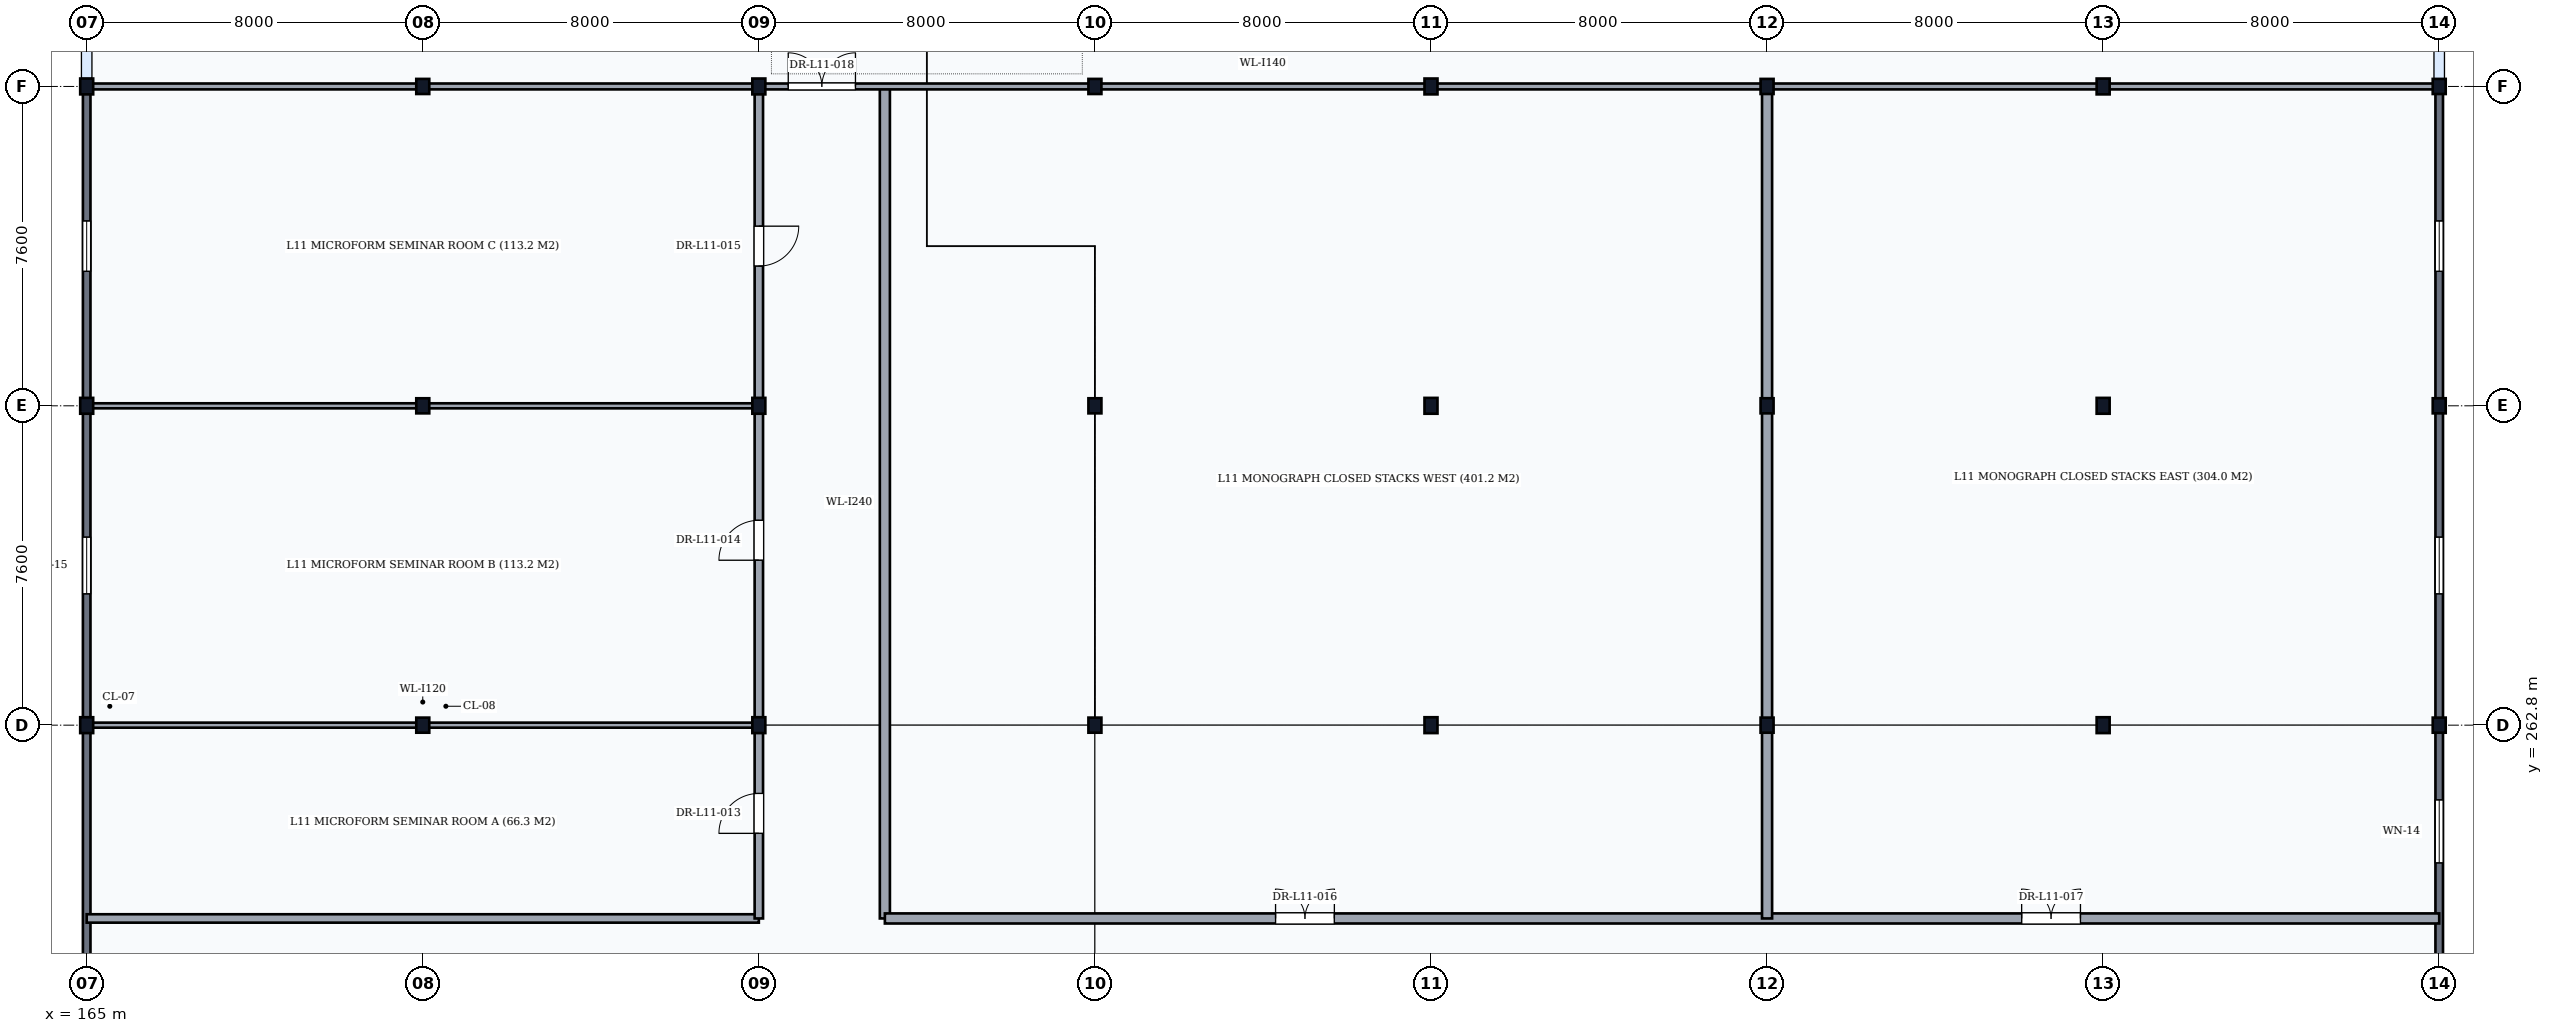
"""IFC4 building model, lengths in metres.
Left out: names, types, materials, properties, quantities, classifications, styles, units other than length and angle.
Written with IfcOpenShell. Run it as: python <this file> out.ifc"""

import sys

from ifc_helpers import new_model, si_unit, direction, frame, frame_2d, origin, origin_2d, place, context, subcontext, project, spatial, rectangle, i_section, extrude, element, fill, save


model = new_model("IFC4")
c1 = context("Model", 3, precision=1e-05, world=origin(), true_north=direction((0.0, 1.0)))
c2 = subcontext(c1, "Body", "Model", "MODEL_VIEW")
j1 = project(units=[si_unit("LENGTHUNIT", "METRE"), si_unit("PLANEANGLEUNIT", "RADIAN")], contexts=[c1])
p1 = place(None, origin())
s1 = spatial("IfcSite", under=j1, at=p1, CompositionType="ELEMENT")
p2 = place(p1, origin())
s2 = spatial("IfcBuilding", under=s1, at=p2, CompositionType="ELEMENT")
p3 = place(p2, frame((0.0, 0.0, 43.8)))
s3 = spatial("IfcBuildingStorey", under=s2, at=p3, CompositionType="ELEMENT", Elevation=43.8)
for number, where, z_axis, x_axis in (
    (1, (165.0, 262.8, 0.0), (0.0, 0.0, 1.0), (1.0, 0.0, 0.0)),
    (2, (165.0, 270.4, 0.0), (0.0, 0.0, 1.0), (1.0, 0.0, 0.0)),
    (3, (165.0, 278.0, 0.0), (0.0, 0.0, 1.0), (1.0, 0.0, 0.0)),
):
    element("IfcColumn", number, at=place(p3, frame(where, z_axis=z_axis, x_axis=x_axis)), inside=s3, PredefinedType="COLUMN", context=c2, shape_type="SweptSolid", body=[
        extrude(i_section(OverallWidth=0.309, OverallDepth=0.377, WebThickness=0.021, FlangeThickness=0.04, FilletRadius=0.027, at=origin_2d()), origin(), (0.0, 0.0, 1.0), 3.9),
    ])
for number, where, z_axis, x_axis in (
    (4, (173.0, 262.8, 0.0), (0.0, 0.0, 1.0), (1.0, 0.0, 0.0)),
    (5, (173.0, 270.4, 0.0), (0.0, 0.0, 1.0), (1.0, 0.0, 0.0)),
    (6, (173.0, 278.0, 0.0), (0.0, 0.0, 1.0), (1.0, 0.0, 0.0)),
):
    element("IfcColumn", number, at=place(p3, frame(where, z_axis=z_axis, x_axis=x_axis)), inside=s3, PredefinedType="COLUMN", context=c2, shape_type="SweptSolid", body=[
        extrude(i_section(OverallWidth=0.309, OverallDepth=0.359, WebThickness=0.021, FlangeThickness=0.04, FilletRadius=0.027, at=origin_2d()), origin(), (0.0, 0.0, 1.0), 3.9),
    ])
for number, where, z_axis, x_axis in (
    (7, (181.0, 262.8, 0.0), (0.0, 0.0, 1.0), (1.0, 0.0, 0.0)),
    (8, (181.0, 270.4, 0.0), (0.0, 0.0, 1.0), (1.0, 0.0, 0.0)),
    (9, (181.0, 278.0, 0.0), (0.0, 0.0, 1.0), (1.0, 0.0, 0.0)),
):
    element("IfcColumn", number, at=place(p3, frame(where, z_axis=z_axis, x_axis=x_axis)), inside=s3, PredefinedType="COLUMN", context=c2, shape_type="SweptSolid", body=[
        extrude(i_section(OverallWidth=0.309, OverallDepth=0.377, WebThickness=0.021, FlangeThickness=0.04, FilletRadius=0.027, at=origin_2d()), origin(), (0.0, 0.0, 1.0), 3.9),
    ])
for number, where, z_axis, x_axis in (
    (10, (189.0, 262.8, 0.0), (0.0, 0.0, 1.0), (1.0, 0.0, 0.0)),
    (11, (189.0, 270.4, 0.0), (0.0, 0.0, 1.0), (1.0, 0.0, 0.0)),
    (12, (189.0, 278.0, 0.0), (0.0, 0.0, 1.0), (1.0, 0.0, 0.0)),
):
    element("IfcColumn", number, at=place(p3, frame(where, z_axis=z_axis, x_axis=x_axis)), inside=s3, PredefinedType="COLUMN", context=c2, shape_type="SweptSolid", body=[
        extrude(i_section(OverallWidth=0.309, OverallDepth=0.359, WebThickness=0.021, FlangeThickness=0.04, FilletRadius=0.027, at=origin_2d()), origin(), (0.0, 0.0, 1.0), 3.9),
    ])
for number, where, z_axis, x_axis in (
    (13, (197.0, 262.8, 0.0), (0.0, 0.0, 1.0), (1.0, 0.0, 0.0)),
    (14, (197.0, 270.4, 0.0), (0.0, 0.0, 1.0), (1.0, 0.0, 0.0)),
    (15, (197.0, 278.0, 0.0), (0.0, 0.0, 1.0), (1.0, 0.0, 0.0)),
):
    element("IfcColumn", number, at=place(p3, frame(where, z_axis=z_axis, x_axis=x_axis)), inside=s3, PredefinedType="COLUMN", context=c2, shape_type="SweptSolid", body=[
        extrude(i_section(OverallWidth=0.309, OverallDepth=0.377, WebThickness=0.021, FlangeThickness=0.04, FilletRadius=0.027, at=origin_2d()), origin(), (0.0, 0.0, 1.0), 3.9),
    ])
for number, where, z_axis, x_axis in (
    (16, (205.0, 262.8, 0.0), (0.0, 0.0, 1.0), (1.0, 0.0, 0.0)),
    (17, (205.0, 270.4, 0.0), (0.0, 0.0, 1.0), (1.0, 0.0, 0.0)),
    (18, (205.0, 278.0, 0.0), (0.0, 0.0, 1.0), (1.0, 0.0, 0.0)),
):
    element("IfcColumn", number, at=place(p3, frame(where, z_axis=z_axis, x_axis=x_axis)), inside=s3, PredefinedType="COLUMN", context=c2, shape_type="SweptSolid", body=[
        extrude(i_section(OverallWidth=0.309, OverallDepth=0.359, WebThickness=0.021, FlangeThickness=0.04, FilletRadius=0.027, at=origin_2d()), origin(), (0.0, 0.0, 1.0), 3.9),
    ])
for number, where, z_axis, x_axis in (
    (19, (213.0, 262.8, 0.0), (0.0, 0.0, 1.0), (1.0, 0.0, 0.0)),
    (20, (213.0, 270.4, 0.0), (0.0, 0.0, 1.0), (1.0, 0.0, 0.0)),
    (21, (213.0, 278.0, 0.0), (0.0, 0.0, 1.0), (1.0, 0.0, 0.0)),
):
    element("IfcColumn", number, at=place(p3, frame(where, z_axis=z_axis, x_axis=x_axis)), inside=s3, PredefinedType="COLUMN", context=c2, shape_type="SweptSolid", body=[
        extrude(i_section(OverallWidth=0.309, OverallDepth=0.377, WebThickness=0.021, FlangeThickness=0.04, FilletRadius=0.027, at=origin_2d()), origin(), (0.0, 0.0, 1.0), 3.9),
    ])
for number, where, z_axis, x_axis in (
    (22, (221.0, 262.8, 0.0), (0.0, 0.0, 1.0), (1.0, 0.0, 0.0)),
    (23, (221.0, 270.4, 0.0), (0.0, 0.0, 1.0), (1.0, 0.0, 0.0)),
    (24, (221.0, 278.0, 0.0), (0.0, 0.0, 1.0), (1.0, 0.0, 0.0)),
):
    element("IfcColumn", number, at=place(p3, frame(where, z_axis=z_axis, x_axis=x_axis)), inside=s3, PredefinedType="COLUMN", context=c2, shape_type="SweptSolid", body=[
        extrude(i_section(OverallWidth=0.309, OverallDepth=0.359, WebThickness=0.021, FlangeThickness=0.04, FilletRadius=0.027, at=origin_2d()), origin(), (0.0, 0.0, 1.0), 3.9),
    ])
p4 = place(p3, frame((165.0, 255.206, 0.0), z_axis=(0.0, 0.0, 1.0), x_axis=(0.0, 1.0, 0.0)))
e25 = element("IfcWall", 25, at=p4, inside=s3, PredefinedType="SOLIDWALL", context=c2, shape_type="SweptSolid", body=[
    extrude(rectangle(XDim=7.588, YDim=0.18, at=frame_2d((3.794, 0.0))), origin(), (0.0, 0.0, 1.0), 3.408),
])
p5 = place(p3, frame((165.0, 262.806, 0.0), z_axis=(0.0, 0.0, 1.0), x_axis=(0.0, 1.0, 0.0)))
e26 = element("IfcWall", 26, at=p5, inside=s3, PredefinedType="SOLIDWALL", context=c2, shape_type="SweptSolid", body=[
    extrude(rectangle(XDim=7.588, YDim=0.18, at=frame_2d((3.794, 0.0))), origin(), (0.0, 0.0, 1.0), 3.408),
])
p6 = place(p5, frame((3.119, 0.0, 0.95)))
e27 = element("IfcOpeningElement", 27, at=p6, cuts=e26, PredefinedType="OPENING", context=c2, shape_type="SweptSolid", body=[
    extrude(rectangle(XDim=1.35, YDim=1.8, at=frame_2d((0.675, 0.9))), frame((0.0, 0.105, 0.0), z_axis=(0.0, -1.0, 0.0), x_axis=(1.0, 0.0, 0.0)), (0.0, 0.0, 1.0), 0.21),
])
p7 = place(p3, frame((165.0, 270.406, 0.0), z_axis=(0.0, 0.0, 1.0), x_axis=(0.0, 1.0, 0.0)))
e28 = element("IfcWall", 28, at=p7, inside=s3, PredefinedType="SOLIDWALL", context=c2, shape_type="SweptSolid", body=[
    extrude(rectangle(XDim=7.588, YDim=0.18, at=frame_2d((3.794, 0.0))), origin(), (0.0, 0.0, 1.0), 3.408),
])
p8 = place(p7, frame((3.194, 0.0, 0.95)))
e29 = element("IfcOpeningElement", 29, at=p8, cuts=e28, PredefinedType="OPENING", context=c2, shape_type="SweptSolid", body=[
    extrude(rectangle(XDim=1.2, YDim=1.8, at=frame_2d((0.6, 0.9))), frame((0.0, 0.105, 0.0), z_axis=(0.0, -1.0, 0.0), x_axis=(1.0, 0.0, 0.0)), (0.0, 0.0, 1.0), 0.21),
])
p9 = place(p3, frame((221.0, 255.206, 0.0), z_axis=(0.0, 0.0, 1.0), x_axis=(0.0, 1.0, 0.0)))
e30 = element("IfcWall", 30, at=p9, inside=s3, PredefinedType="SOLIDWALL", context=c2, shape_type="SweptSolid", body=[
    extrude(rectangle(XDim=7.588, YDim=0.18, at=frame_2d((3.794, 0.0))), origin(), (0.0, 0.0, 1.0), 3.408),
])
p10 = place(p9, frame((4.316, 0.0, 0.95)))
e31 = element("IfcOpeningElement", 31, at=p10, cuts=e30, PredefinedType="OPENING", context=c2, shape_type="SweptSolid", body=[
    extrude(rectangle(XDim=1.5, YDim=1.9, at=frame_2d((0.75, 0.95))), frame((0.0, 0.105, 0.0), z_axis=(0.0, -1.0, 0.0), x_axis=(1.0, 0.0, 0.0)), (0.0, 0.0, 1.0), 0.21),
])
p11 = place(p3, frame((221.0, 262.806, 0.0), z_axis=(0.0, 0.0, 1.0), x_axis=(0.0, 1.0, 0.0)))
e32 = element("IfcWall", 32, at=p11, inside=s3, PredefinedType="SOLIDWALL", context=c2, shape_type="SweptSolid", body=[
    extrude(rectangle(XDim=7.588, YDim=0.18, at=frame_2d((3.794, 0.0))), origin(), (0.0, 0.0, 1.0), 3.408),
])
p12 = place(p11, frame((3.119, 0.0, 0.95)))
e33 = element("IfcOpeningElement", 33, at=p12, cuts=e32, PredefinedType="OPENING", context=c2, shape_type="SweptSolid", body=[
    extrude(rectangle(XDim=1.35, YDim=1.8, at=frame_2d((0.675, 0.9))), frame((0.0, 0.105, 0.0), z_axis=(0.0, -1.0, 0.0), x_axis=(1.0, 0.0, 0.0)), (0.0, 0.0, 1.0), 0.21),
])
p13 = place(p3, frame((221.0, 270.406, 0.0), z_axis=(0.0, 0.0, 1.0), x_axis=(0.0, 1.0, 0.0)))
e34 = element("IfcWall", 34, at=p13, inside=s3, PredefinedType="SOLIDWALL", context=c2, shape_type="SweptSolid", body=[
    extrude(rectangle(XDim=7.588, YDim=0.18, at=frame_2d((3.794, 0.0))), origin(), (0.0, 0.0, 1.0), 3.408),
])
p14 = place(p13, frame((3.194, 0.0, 0.95)))
e35 = element("IfcOpeningElement", 35, at=p14, cuts=e34, PredefinedType="OPENING", context=c2, shape_type="SweptSolid", body=[
    extrude(rectangle(XDim=1.2, YDim=1.8, at=frame_2d((0.6, 0.9))), frame((0.0, 0.105, 0.0), z_axis=(0.0, -1.0, 0.0), x_axis=(1.0, 0.0, 0.0)), (0.0, 0.0, 1.0), 0.21),
])
p15 = place(p3, frame((165.0, 258.2, 0.0), z_axis=(0.0, 0.0, 1.0), x_axis=(1.0, 0.0, 0.0)))
e36 = element("IfcWall", 36, at=p15, inside=s3, PredefinedType="PARTITIONING", context=c2, shape_type="SweptSolid", body=[
    extrude(rectangle(XDim=16.0, YDim=0.2, at=frame_2d((8.0, 0.0))), origin(), (0.0, 0.0, 1.0), 3.68),
])
p16 = place(p3, frame((181.0, 258.2, 0.0), z_axis=(0.0, 0.0, 1.0), x_axis=(0.0, 1.0, 0.0)))
e37 = element("IfcWall", 37, at=p16, inside=s3, PredefinedType="PARTITIONING", context=c2, shape_type="SweptSolid", body=[
    extrude(rectangle(XDim=19.8, YDim=0.2, at=frame_2d((9.9, 0.0))), origin(), (0.0, 0.0, 1.0), 3.278),
])
p17 = place(p16, frame((2.025, 0.0, 0.0)))
e38 = element("IfcOpeningElement", 38, at=p17, cuts=e37, PredefinedType="OPENING", context=c2, shape_type="SweptSolid", body=[
    extrude(rectangle(XDim=0.95, YDim=2.1, at=frame_2d((0.475, 1.05))), frame((0.0, 0.115, 0.0), z_axis=(0.0, -1.0, 0.0), x_axis=(1.0, 0.0, 0.0)), (0.0, 0.0, 1.0), 0.23),
])
p18 = place(p16, frame((8.525, 0.0, 0.0)))
e39 = element("IfcOpeningElement", 39, at=p18, cuts=e37, PredefinedType="OPENING", context=c2, shape_type="SweptSolid", body=[
    extrude(rectangle(XDim=0.95, YDim=2.1, at=frame_2d((0.475, 1.05))), frame((0.0, 0.115, 0.0), z_axis=(0.0, -1.0, 0.0), x_axis=(1.0, 0.0, 0.0)), (0.0, 0.0, 1.0), 0.23),
])
p19 = place(p16, frame((15.525, 0.0, 0.0)))
e40 = element("IfcOpeningElement", 40, at=p19, cuts=e37, PredefinedType="OPENING", context=c2, shape_type="SweptSolid", body=[
    extrude(rectangle(XDim=0.95, YDim=2.1, at=frame_2d((0.475, 1.05))), frame((0.0, 0.115, 0.0), z_axis=(0.0, -1.0, 0.0), x_axis=(1.0, 0.0, 0.0)), (0.0, 0.0, 1.0), 0.23),
])
for number, where, z_axis, x_axis in (
    (41, (165.0, 262.8, 0.0), (0.0, 0.0, 1.0), (1.0, 0.0, 0.0)),
    (42, (165.0, 270.4, 0.0), (0.0, 0.0, 1.0), (1.0, 0.0, 0.0)),
):
    element("IfcWall", number, at=place(p3, frame(where, z_axis=z_axis, x_axis=x_axis)), inside=s3, PredefinedType="PARTITIONING", context=c2, shape_type="SweptSolid", body=[
        extrude(rectangle(XDim=16.0, YDim=0.12, at=frame_2d((8.0, 0.0))), origin(), (0.0, 0.0, 1.0), 3.178),
    ])
p20 = place(p3, frame((184.0, 258.2, 0.0), z_axis=(0.0, 0.0, 1.0), x_axis=(0.0, 1.0, 0.0)))
e43 = element("IfcWall", 43, at=p20, inside=s3, PredefinedType="PARTITIONING", context=c2, shape_type="SweptSolid", body=[
    extrude(rectangle(XDim=19.8, YDim=0.24, at=frame_2d((9.9, 0.0))), origin(), (0.0, 0.0, 1.0), 3.68),
])
p21 = place(p3, frame((184.0, 258.2, 0.0), z_axis=(0.0, 0.0, 1.0), x_axis=(1.0, 0.0, 0.0)))
e44 = element("IfcWall", 44, at=p21, inside=s3, PredefinedType="PARTITIONING", context=c2, shape_type="SweptSolid", body=[
    extrude(rectangle(XDim=37.0, YDim=0.24, at=frame_2d((18.5, 0.0))), origin(), (0.0, 0.0, 1.0), 3.68),
])
p22 = place(p21, frame((9.3, 0.0, 0.0)))
e45 = element("IfcOpeningElement", 45, at=p22, cuts=e44, PredefinedType="OPENING", context=c2, shape_type="SweptSolid", body=[
    extrude(rectangle(XDim=1.4, YDim=2.1, at=frame_2d((0.7, 1.05))), frame((0.0, 0.135, 0.0), z_axis=(0.0, -1.0, 0.0), x_axis=(1.0, 0.0, 0.0)), (0.0, 0.0, 1.0), 0.27),
])
p23 = place(p21, frame((27.06, 0.0, 0.0)))
e46 = element("IfcOpeningElement", 46, at=p23, cuts=e44, PredefinedType="OPENING", context=c2, shape_type="SweptSolid", body=[
    extrude(rectangle(XDim=1.4, YDim=2.1, at=frame_2d((0.7, 1.05))), frame((0.0, 0.135, 0.0), z_axis=(0.0, -1.0, 0.0), x_axis=(1.0, 0.0, 0.0)), (0.0, 0.0, 1.0), 0.27),
])
p24 = place(p3, frame((205.0, 258.2, 0.0), z_axis=(0.0, 0.0, 1.0), x_axis=(0.0, 1.0, 0.0)))
e47 = element("IfcWall", 47, at=p24, inside=s3, PredefinedType="PARTITIONING", context=c2, shape_type="SweptSolid", body=[
    extrude(rectangle(XDim=19.8, YDim=0.24, at=frame_2d((9.9, 0.0))), origin(), (0.0, 0.0, 1.0), 3.278),
])
p25 = place(p3, frame((165.0, 278.0, 0.0), z_axis=(0.0, 0.0, 1.0), x_axis=(1.0, 0.0, 0.0)))
e48 = element("IfcWall", 48, at=p25, inside=s3, PredefinedType="PARTITIONING", context=c2, shape_type="SweptSolid", body=[
    extrude(rectangle(XDim=56.0, YDim=0.14, at=frame_2d((28.0, 0.0))), origin(), (0.0, 0.0, 1.0), 3.178),
])
p26 = place(p25, frame((16.7, 0.0, 0.0)))
e49 = element("IfcOpeningElement", 49, at=p26, cuts=e48, PredefinedType="OPENING", context=c2, shape_type="SweptSolid", body=[
    extrude(rectangle(XDim=1.6, YDim=2.25, at=frame_2d((0.8, 1.125))), frame((0.0, 0.085, 0.0), z_axis=(0.0, -1.0, 0.0), x_axis=(1.0, 0.0, 0.0)), (0.0, 0.0, 1.0), 0.17),
])
p27 = place(p6, origin())
e50 = element("IfcWindow", 50, at=p27, inside=s3, PartitioningType="SINGLE_PANEL", PredefinedType="WINDOW", context=c2, shape_type="SweptSolid", body=[
    extrude(rectangle(XDim=1.35, YDim=1.8, at=frame_2d((0.675, 0.9))), frame((0.0, 0.03, 0.0), z_axis=(0.0, -1.0, 0.0), x_axis=(1.0, 0.0, 0.0)), (0.0, 0.0, 1.0), 0.06),
])
fill(e27, e50)
p28 = place(p8, origin())
e51 = element("IfcWindow", 51, at=p28, inside=s3, PartitioningType="SINGLE_PANEL", PredefinedType="WINDOW", context=c2, shape_type="SweptSolid", body=[
    extrude(rectangle(XDim=1.2, YDim=1.8, at=frame_2d((0.6, 0.9))), frame((0.0, 0.03, 0.0), z_axis=(0.0, -1.0, 0.0), x_axis=(1.0, 0.0, 0.0)), (0.0, 0.0, 1.0), 0.06),
])
fill(e29, e51)
p29 = place(p10, origin())
e52 = element("IfcWindow", 52, at=p29, inside=s3, PartitioningType="SINGLE_PANEL", PredefinedType="WINDOW", context=c2, shape_type="SweptSolid", body=[
    extrude(rectangle(XDim=1.5, YDim=1.9, at=frame_2d((0.75, 0.95))), frame((0.0, 0.03, 0.0), z_axis=(0.0, -1.0, 0.0), x_axis=(1.0, 0.0, 0.0)), (0.0, 0.0, 1.0), 0.06),
])
fill(e31, e52)
p30 = place(p12, origin())
e53 = element("IfcWindow", 53, at=p30, inside=s3, PartitioningType="SINGLE_PANEL", PredefinedType="WINDOW", context=c2, shape_type="SweptSolid", body=[
    extrude(rectangle(XDim=1.35, YDim=1.8, at=frame_2d((0.675, 0.9))), frame((0.0, 0.03, 0.0), z_axis=(0.0, -1.0, 0.0), x_axis=(1.0, 0.0, 0.0)), (0.0, 0.0, 1.0), 0.06),
])
fill(e33, e53)
p31 = place(p14, origin())
e54 = element("IfcWindow", 54, at=p31, inside=s3, PartitioningType="SINGLE_PANEL", PredefinedType="WINDOW", context=c2, shape_type="SweptSolid", body=[
    extrude(rectangle(XDim=1.2, YDim=1.8, at=frame_2d((0.6, 0.9))), frame((0.0, 0.03, 0.0), z_axis=(0.0, -1.0, 0.0), x_axis=(1.0, 0.0, 0.0)), (0.0, 0.0, 1.0), 0.06),
])
fill(e35, e54)
p32 = place(p17, origin())
e55 = element("IfcDoor", 55, at=p32, inside=s3, OperationType="SINGLE_SWING_LEFT", PredefinedType="DOOR", context=c2, shape_type="SweptSolid", body=[
    extrude(rectangle(XDim=0.95, YDim=2.1, at=frame_2d((0.475, 1.05))), frame((0.0, 0.025, 0.0), z_axis=(0.0, -1.0, 0.0), x_axis=(1.0, 0.0, 0.0)), (0.0, 0.0, 1.0), 0.05),
])
fill(e38, e55)
p33 = place(p18, origin())
e56 = element("IfcDoor", 56, at=p33, inside=s3, OperationType="SINGLE_SWING_LEFT", PredefinedType="DOOR", context=c2, shape_type="SweptSolid", body=[
    extrude(rectangle(XDim=0.95, YDim=2.1, at=frame_2d((0.475, 1.05))), frame((0.0, 0.025, 0.0), z_axis=(0.0, -1.0, 0.0), x_axis=(1.0, 0.0, 0.0)), (0.0, 0.0, 1.0), 0.05),
])
fill(e39, e56)
p34 = place(p19, origin())
e57 = element("IfcDoor", 57, at=p34, inside=s3, OperationType="SINGLE_SWING_RIGHT", PredefinedType="DOOR", context=c2, shape_type="SweptSolid", body=[
    extrude(rectangle(XDim=0.95, YDim=2.1, at=frame_2d((0.475, 1.05))), frame((0.0, 0.025, 0.0), z_axis=(0.0, -1.0, 0.0), x_axis=(1.0, 0.0, 0.0)), (0.0, 0.0, 1.0), 0.05),
])
fill(e40, e57)
p35 = place(p22, origin())
e58 = element("IfcDoor", 58, at=p35, inside=s3, OperationType="DOUBLE_DOOR_SINGLE_SWING", PredefinedType="DOOR", context=c2, shape_type="SweptSolid", body=[
    extrude(rectangle(XDim=1.4, YDim=2.1, at=frame_2d((0.7, 1.05))), frame((0.0, 0.025, 0.0), z_axis=(0.0, -1.0, 0.0), x_axis=(1.0, 0.0, 0.0)), (0.0, 0.0, 1.0), 0.05),
])
fill(e45, e58)
p36 = place(p23, origin())
e59 = element("IfcDoor", 59, at=p36, inside=s3, OperationType="DOUBLE_DOOR_SINGLE_SWING", PredefinedType="DOOR", context=c2, shape_type="SweptSolid", body=[
    extrude(rectangle(XDim=1.4, YDim=2.1, at=frame_2d((0.7, 1.05))), frame((0.0, 0.025, 0.0), z_axis=(0.0, -1.0, 0.0), x_axis=(1.0, 0.0, 0.0)), (0.0, 0.0, 1.0), 0.05),
])
fill(e46, e59)
p37 = place(p26, origin())
e60 = element("IfcDoor", 60, at=p37, inside=s3, OperationType="DOUBLE_DOOR_SINGLE_SWING", PredefinedType="DOOR", context=c2, shape_type="SweptSolid", body=[
    extrude(rectangle(XDim=1.6, YDim=2.25, at=frame_2d((0.8, 1.125))), frame((0.0, 0.025, 0.0), z_axis=(0.0, -1.0, 0.0), x_axis=(1.0, 0.0, 0.0)), (0.0, 0.0, 1.0), 0.05),
])
fill(e49, e60)
save(model, sys.argv[1])
